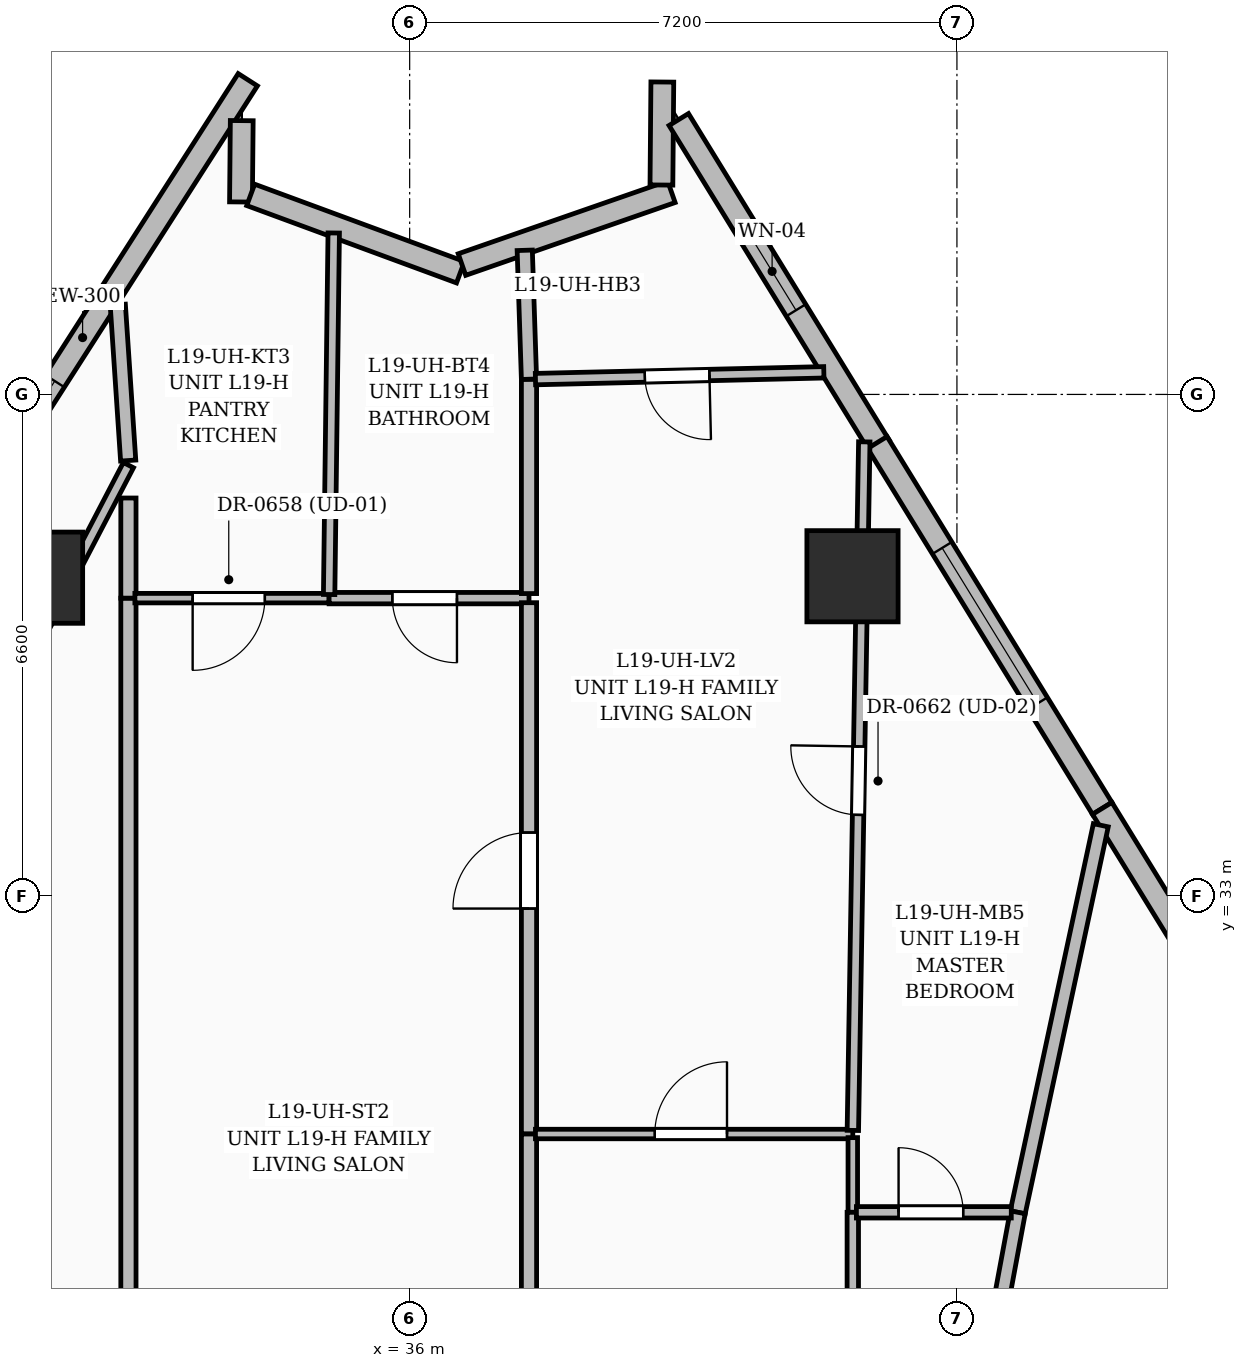
"""IFC4 building model, lengths in metres.
Left out: names, types, materials, properties, quantities, classifications, styles, units other than length and angle.
Written with IfcOpenShell. Run it as: python <this file> out.ifc"""

import sys

from ifc_helpers import new_model, si_unit, direction, frame, frame_2d, origin, origin_2d, place, context, subcontext, project, spatial, rectangle, extrude, element, fill, save


model = new_model("IFC4")
c1 = context("Model", 3, precision=1e-05, world=origin(), true_north=direction((0.0, 1.0)))
c2 = subcontext(c1, "Body", "Model", "MODEL_VIEW")
j1 = project(units=[si_unit("LENGTHUNIT", "METRE"), si_unit("PLANEANGLEUNIT", "RADIAN")], contexts=[c1])
p1 = place(None, origin())
s1 = spatial("IfcSite", under=j1, at=p1, CompositionType="ELEMENT")
p2 = place(p1, origin())
s2 = spatial("IfcBuilding", under=s1, at=p2, CompositionType="ELEMENT")
p3 = place(p2, frame((0.0, 0.0, 78.6)))
s3 = spatial("IfcBuildingStorey", under=s2, at=p3, CompositionType="ELEMENT", Elevation=78.6)
for number, where, z_axis, x_axis in (
    (1, (41.826, 37.208, 0.0), (0.0, 0.0, 1.0), (1.0, 0.0, 0.0)),
    (2, (31.098, 37.189, 0.0), (0.0, 0.0, 1.0), (1.0, 0.0, 0.0)),
):
    element("IfcColumn", number, at=place(p3, frame(where, z_axis=z_axis, x_axis=x_axis)), inside=s3, PredefinedType="COLUMN", context=c2, shape_type="SweptSolid", body=[
        extrude(rectangle(XDim=1.2, YDim=1.2, at=origin_2d()), origin(), (0.0, 0.0, 1.0), 3.6),
    ])
p4 = place(p3, frame((29.524, 36.955, 0.0), z_axis=(0.0, 0.0, 1.0), x_axis=(0.539470626143, 0.842004420136, 0.0)))
e3 = element("IfcWall", 3, at=p4, inside=s3, PredefinedType="SOLIDWALL", context=c2, shape_type="SweptSolid", body=[
    extrude(rectangle(XDim=8.058, YDim=0.3, at=frame_2d((4.029, 0.0))), origin(), (0.0, 0.0, 1.0), 3.35),
])
p5 = place(p4, frame((0.95, 0.0, 0.6)))
e4 = element("IfcOpeningElement", 4, at=p5, cuts=e3, PredefinedType="OPENING", context=c2, shape_type="SweptSolid", body=[
    extrude(rectangle(XDim=2.4, YDim=2.1, at=frame_2d((1.2, 1.05))), frame((0.0, 0.16, 0.0), z_axis=(0.0, -1.0, 0.0), x_axis=(1.0, 0.0, 0.0)), (0.0, 0.0, 1.0), 0.32),
])
p6 = place(p3, frame((33.791, 43.202, 0.0), z_axis=(0.0, 0.0, 1.0), x_axis=(-0.009584224316, -0.999954070267, 0.0)))
e5 = element("IfcWall", 5, at=p6, inside=s3, PredefinedType="SOLIDWALL", context=c2, shape_type="SweptSolid", body=[
    extrude(rectangle(XDim=1.07, YDim=0.3, at=frame_2d((0.535, 0.0))), origin(), (0.0, 0.0, 1.0), 3.35),
])
p7 = place(p3, frame((33.909, 42.225, 0.0), z_axis=(0.0, 0.0, 1.0), x_axis=(0.938225446259, -0.346024582931, 0.0)))
e6 = element("IfcWall", 6, at=p7, inside=s3, PredefinedType="SOLIDWALL", context=c2, shape_type="SweptSolid", body=[
    extrude(rectangle(XDim=2.941, YDim=0.3, at=frame_2d((1.471, 0.0))), origin(), (0.0, 0.0, 1.0), 3.35),
])
p8 = place(p3, frame((36.688, 41.309, 0.0), z_axis=(0.0, 0.0, 1.0), x_axis=(0.944571305793, 0.328306332978, 0.0)))
e7 = element("IfcWall", 7, at=p8, inside=s3, PredefinedType="SOLIDWALL", context=c2, shape_type="SweptSolid", body=[
    extrude(rectangle(XDim=2.917, YDim=0.3, at=frame_2d((1.458, 0.0))), origin(), (0.0, 0.0, 1.0), 3.35),
])
p9 = place(p3, frame((39.312, 42.355, 0.0), z_axis=(0.0, 0.0, 1.0), x_axis=(0.008828484753, 0.999961028169, 0.0)))
e8 = element("IfcWall", 8, at=p9, inside=s3, PredefinedType="SOLIDWALL", context=c2, shape_type="SweptSolid", body=[
    extrude(rectangle(XDim=1.355, YDim=0.3, at=frame_2d((0.677, 0.0))), origin(), (0.0, 0.0, 1.0), 3.35),
])
p10 = place(p3, frame((39.54, 43.217, 0.0), z_axis=(0.0, 0.0, 1.0), x_axis=(0.52373802156, -0.851879383935, 0.0)))
e9 = element("IfcWall", 9, at=p10, inside=s3, PredefinedType="SOLIDWALL", context=c2, shape_type="SweptSolid", body=[
    extrude(rectangle(XDim=5.042, YDim=0.3, at=frame_2d((2.521, 0.0))), origin(), (0.0, 0.0, 1.0), 3.35),
])
p11 = place(p10, frame((1.745, 0.0, 0.8)))
e10 = element("IfcOpeningElement", 10, at=p11, cuts=e9, PredefinedType="OPENING", context=c2, shape_type="SweptSolid", body=[
    extrude(rectangle(XDim=1.2, YDim=1.8, at=frame_2d((0.6, 0.9))), frame((0.0, 0.16, 0.0), z_axis=(0.0, -1.0, 0.0), x_axis=(1.0, 0.0, 0.0)), (0.0, 0.0, 1.0), 0.32),
])
p12 = place(p3, frame((42.153, 38.967, 0.0), z_axis=(0.0, 0.0, 1.0), x_axis=(0.523687465278, -0.851910464022, 0.0)))
e11 = element("IfcWall", 11, at=p12, inside=s3, PredefinedType="SOLIDWALL", context=c2, shape_type="SweptSolid", body=[
    extrude(rectangle(XDim=5.649, YDim=0.3, at=frame_2d((2.825, 0.0))), origin(), (0.0, 0.0, 1.0), 3.35),
])
p13 = place(p12, frame((1.628, 0.0, 0.6)))
e12 = element("IfcOpeningElement", 12, at=p13, cuts=e11, PredefinedType="OPENING", context=c2, shape_type="SweptSolid", body=[
    extrude(rectangle(XDim=2.4, YDim=2.1, at=frame_2d((1.2, 1.05))), frame((0.0, 0.16, 0.0), z_axis=(0.0, -1.0, 0.0), x_axis=(1.0, 0.0, 0.0)), (0.0, 0.0, 1.0), 0.32),
])
p14 = place(p3, frame((45.111, 34.154, 0.0), z_axis=(0.0, 0.0, 1.0), x_axis=(0.523710369238, -0.851896384047, 0.0)))
e13 = element("IfcWall", 13, at=p14, inside=s3, PredefinedType="SOLIDWALL", context=c2, shape_type="SweptSolid", body=[
    extrude(rectangle(XDim=5.596, YDim=0.3, at=frame_2d((2.798, 0.0))), origin(), (0.0, 0.0, 1.0), 3.35),
])
p15 = place(p14, frame((1.85, 0.0, 0.55)))
e14 = element("IfcOpeningElement", 14, at=p15, cuts=e13, PredefinedType="OPENING", context=c2, shape_type="SweptSolid", body=[
    extrude(rectangle(XDim=2.1, YDim=2.4, at=frame_2d((1.05, 1.2))), frame((0.0, 0.16, 0.0), z_axis=(0.0, -1.0, 0.0), x_axis=(1.0, 0.0, 0.0)), (0.0, 0.0, 1.0), 0.32),
])
p16 = place(p3, frame((21.4, 17.75, 0.0), z_axis=(0.0, 0.0, 1.0), x_axis=(0.46207959711, 0.886838455376, 0.0)))
e15 = element("IfcWall", 15, at=p16, inside=s3, PredefinedType="PARTITIONING", context=c2, shape_type="SweptSolid", body=[
    extrude(rectangle(XDim=23.589, YDim=0.15, at=frame_2d((11.795, 0.0))), origin(), (0.0, 0.0, 1.0), 2.345),
])
p17 = place(p3, frame((32.297, 38.73, 0.0), z_axis=(0.0, 0.0, 1.0), x_axis=(-0.066629370629, 0.997777794386, 0.0)))
e16 = element("IfcWall", 16, at=p17, inside=s3, PredefinedType="PARTITIONING", context=c2, shape_type="SweptSolid", body=[
    extrude(rectangle(XDim=2.056, YDim=0.2, at=frame_2d((1.028, 0.0))), origin(), (0.0, 0.0, 1.0), 3.35),
])
p18 = place(p3, frame((32.3, 26.145, 0.0), z_axis=(0.0, 0.0, 1.0), x_axis=(0.0, 1.0, 0.0)))
e17 = element("IfcWall", 17, at=p18, inside=s3, PredefinedType="PARTITIONING", context=c2, shape_type="SweptSolid", body=[
    extrude(rectangle(XDim=10.775, YDim=0.2, at=frame_2d((5.387, 0.0))), origin(), (0.0, 0.0, 1.0), 2.345),
])
p19 = place(p3, frame((32.3, 36.92, 0.0), z_axis=(0.0, 0.0, 1.0), x_axis=(0.0, 1.0, 0.0)))
e18 = element("IfcWall", 18, at=p19, inside=s3, PredefinedType="PARTITIONING", context=c2, shape_type="SweptSolid", body=[
    extrude(rectangle(XDim=1.317, YDim=0.2, at=frame_2d((0.659, 0.0))), origin(), (0.0, 0.0, 1.0), 2.37),
])
p20 = place(p3, frame((45.093, 33.932, 0.0), z_axis=(0.0, 0.0, 1.0), x_axis=(-0.209881245986, -0.977726885476, 0.0)))
e19 = element("IfcWall", 19, at=p20, inside=s3, PredefinedType="PARTITIONING", context=c2, shape_type="SweptSolid", body=[
    extrude(rectangle(XDim=5.208, YDim=0.2, at=frame_2d((2.604, 0.0))), origin(), (0.0, 0.0, 1.0), 2.37),
])
p21 = place(p3, frame((44.0, 28.84, 0.0), z_axis=(0.0, 0.0, 1.0), x_axis=(-0.18247668152, -0.983210181345, 0.0)))
e20 = element("IfcWall", 20, at=p21, inside=s3, PredefinedType="PARTITIONING", context=c2, shape_type="SweptSolid", body=[
    extrude(rectangle(XDim=2.685, YDim=0.2, at=frame_2d((1.343, 0.0))), origin(), (0.0, 0.0, 1.0), 3.01),
])
p22 = place(p3, frame((34.94, 36.92, 0.0), z_axis=(0.0, 0.0, 1.0), x_axis=(-1.0, 0.0, 0.0)))
e21 = element("IfcWall", 21, at=p22, inside=s3, PredefinedType="PARTITIONING", context=c2, shape_type="SweptSolid", body=[
    extrude(rectangle(XDim=2.555, YDim=0.125, at=frame_2d((1.277, 0.0))), origin(), (0.0, 0.0, 1.0), 2.37),
])
p23 = place(p22, frame((0.845, 0.0, 0.0)))
e22 = element("IfcOpeningElement", 22, at=p23, cuts=e21, PredefinedType="OPENING", context=c2, shape_type="SweptSolid", body=[
    extrude(rectangle(XDim=0.95, YDim=2.2, at=frame_2d((0.475, 1.1))), frame((0.0, 0.072, 0.0), z_axis=(0.0, -1.0, 0.0), x_axis=(1.0, 0.0, 0.0)), (0.0, 0.0, 1.0), 0.145),
])
p24 = place(p3, frame((37.57, 36.92, 0.0), z_axis=(0.0, 0.0, 1.0), x_axis=(-1.0, 0.0, 0.0)))
e23 = element("IfcWall", 23, at=p24, inside=s3, PredefinedType="PARTITIONING", context=c2, shape_type="SweptSolid", body=[
    extrude(rectangle(XDim=2.63, YDim=0.15, at=frame_2d((1.315, 0.0))), origin(), (0.0, 0.0, 1.0), 2.37),
])
p25 = place(p24, frame((0.948, 0.0, 0.0)))
e24 = element("IfcOpeningElement", 24, at=p25, cuts=e23, PredefinedType="OPENING", context=c2, shape_type="SweptSolid", body=[
    extrude(rectangle(XDim=0.85, YDim=2.1, at=frame_2d((0.425, 1.05))), frame((0.0, 0.085, 0.0), z_axis=(0.0, -1.0, 0.0), x_axis=(1.0, 0.0, 0.0)), (0.0, 0.0, 1.0), 0.17),
])
p26 = place(p3, frame((37.57, 29.87, 0.0), z_axis=(0.0, 0.0, 1.0), x_axis=(0.0, 1.0, 0.0)))
e25 = element("IfcWall", 25, at=p26, inside=s3, PredefinedType="PARTITIONING", context=c2, shape_type="SweptSolid", body=[
    extrude(rectangle(XDim=6.99, YDim=0.2, at=frame_2d((3.495, 0.0))), origin(), (0.0, 0.0, 1.0), 2.37),
])
p27 = place(p26, frame((2.966, 0.0, 0.0)))
e26 = element("IfcOpeningElement", 26, at=p27, cuts=e25, PredefinedType="OPENING", context=c2, shape_type="SweptSolid", body=[
    extrude(rectangle(XDim=1.0, YDim=2.2, at=frame_2d((0.5, 1.1))), frame((0.0, 0.11, 0.0), z_axis=(0.0, -1.0, 0.0), x_axis=(1.0, 0.0, 0.0)), (0.0, 0.0, 1.0), 0.22),
])
p28 = place(p3, frame((37.57, 26.015, 0.0), z_axis=(0.0, 0.0, 1.0), x_axis=(0.0, 1.0, 0.0)))
e27 = element("IfcWall", 27, at=p28, inside=s3, PredefinedType="PARTITIONING", context=c2, shape_type="SweptSolid", body=[
    extrude(rectangle(XDim=3.855, YDim=0.2, at=frame_2d((1.928, 0.0))), origin(), (0.0, 0.0, 1.0), 3.01),
])
p29 = place(p3, frame((34.94, 36.968, 0.0), z_axis=(0.0, 0.0, 1.0), x_axis=(0.012728014725, 0.99991899554, 0.0)))
e28 = element("IfcWall", 28, at=p29, inside=s3, PredefinedType="PARTITIONING", context=c2, shape_type="SweptSolid", body=[
    extrude(rectangle(XDim=4.757, YDim=0.15, at=frame_2d((2.378, 0.0))), origin(), (0.0, 0.0, 1.0), 2.37),
])
p30 = place(p3, frame((37.57, 36.98, 0.0), z_axis=(0.0, 0.0, 1.0), x_axis=(0.0, 1.0, 0.0)))
e29 = element("IfcWall", 29, at=p30, inside=s3, PredefinedType="PARTITIONING", context=c2, shape_type="SweptSolid", body=[
    extrude(rectangle(XDim=2.82, YDim=0.2, at=frame_2d((1.41, 0.0))), origin(), (0.0, 0.0, 1.0), 2.37),
])
p31 = place(p3, frame((37.57, 39.8, 0.0), z_axis=(0.0, 0.0, 1.0), x_axis=(-0.033089686033, 0.999452386399, 0.0)))
e30 = element("IfcWall", 30, at=p31, inside=s3, PredefinedType="PARTITIONING", context=c2, shape_type="SweptSolid", body=[
    extrude(rectangle(XDim=1.697, YDim=0.2, at=frame_2d((0.849, 0.0))), origin(), (0.0, 0.0, 1.0), 3.35),
])
p32 = place(p3, frame((41.449, 39.891, 0.0), z_axis=(0.0, 0.0, 1.0), x_axis=(-0.999721247685, -0.02360989047, 0.0)))
e31 = element("IfcWall", 31, at=p32, inside=s3, PredefinedType="PARTITIONING", context=c2, shape_type="SweptSolid", body=[
    extrude(rectangle(XDim=3.795, YDim=0.15, at=frame_2d((1.897, 0.0))), origin(), (0.0, 0.0, 1.0), 3.35),
])
p33 = place(p32, frame((1.506, 0.0, 0.0)))
e32 = element("IfcOpeningElement", 32, at=p33, cuts=e31, PredefinedType="OPENING", context=c2, shape_type="SweptSolid", body=[
    extrude(rectangle(XDim=0.85, YDim=2.1, at=frame_2d((0.425, 1.05))), frame((0.0, 0.085, 0.0), z_axis=(0.0, -1.0, 0.0), x_axis=(1.0, 0.0, 0.0)), (0.0, 0.0, 1.0), 0.17),
])
p34 = place(p3, frame((37.655, 29.87, 0.0), z_axis=(0.0, 0.0, 1.0), x_axis=(1.0, 0.0, 0.0)))
e33 = element("IfcWall", 33, at=p34, inside=s3, PredefinedType="PARTITIONING", context=c2, shape_type="SweptSolid", body=[
    extrude(rectangle(XDim=4.175, YDim=0.125, at=frame_2d((2.087, 0.0))), origin(), (0.0, 0.0, 1.0), 3.35),
])
p35 = place(p34, frame((1.57, 0.0, 0.0)))
e34 = element("IfcOpeningElement", 34, at=p35, cuts=e33, PredefinedType="OPENING", context=c2, shape_type="SweptSolid", body=[
    extrude(rectangle(XDim=0.95, YDim=2.2, at=frame_2d((0.475, 1.1))), frame((0.0, 0.072, 0.0), z_axis=(0.0, -1.0, 0.0), x_axis=(1.0, 0.0, 0.0)), (0.0, 0.0, 1.0), 0.145),
])
p36 = place(p3, frame((41.831, 29.917, 0.0), z_axis=(0.0, 0.0, 1.0), x_axis=(0.016599696118, 0.999862215552, 0.0)))
e35 = element("IfcWall", 35, at=p36, inside=s3, PredefinedType="PARTITIONING", context=c2, shape_type="SweptSolid", body=[
    extrude(rectangle(XDim=9.06, YDim=0.15, at=frame_2d((4.53, 0.0))), origin(), (0.0, 0.0, 1.0), 2.345),
])
p37 = place(p36, frame((4.152, 0.0, 0.0)))
e36 = element("IfcOpeningElement", 36, at=p37, cuts=e35, PredefinedType="OPENING", context=c2, shape_type="SweptSolid", body=[
    extrude(rectangle(XDim=0.9, YDim=2.15, at=frame_2d((0.45, 1.075))), frame((0.0, 0.085, 0.0), z_axis=(0.0, -1.0, 0.0), x_axis=(1.0, 0.0, 0.0)), (0.0, 0.0, 1.0), 0.17),
])
p38 = place(p3, frame((41.83, 28.84, 0.0), z_axis=(0.0, 0.0, 1.0), x_axis=(0.0, 1.0, 0.0)))
e37 = element("IfcWall", 37, at=p38, inside=s3, PredefinedType="PARTITIONING", context=c2, shape_type="SweptSolid", body=[
    extrude(rectangle(XDim=0.982, YDim=0.125, at=frame_2d((0.491, 0.0))), origin(), (0.0, 0.0, 1.0), 3.01),
])
p39 = place(p3, frame((41.83, 26.015, 0.0), z_axis=(0.0, 0.0, 1.0), x_axis=(0.0, 1.0, 0.0)))
e38 = element("IfcWall", 38, at=p39, inside=s3, PredefinedType="PARTITIONING", context=c2, shape_type="SweptSolid", body=[
    extrude(rectangle(XDim=2.825, YDim=0.15, at=frame_2d((1.413, 0.0))), origin(), (0.0, 0.0, 1.0), 2.309),
])
p40 = place(p3, frame((41.877, 28.84, 0.0), z_axis=(0.0, 0.0, 1.0), x_axis=(1.0, 0.0, 0.0)))
e39 = element("IfcWall", 39, at=p40, inside=s3, PredefinedType="PARTITIONING", context=c2, shape_type="SweptSolid", body=[
    extrude(rectangle(XDim=2.038, YDim=0.15, at=frame_2d((1.019, 0.0))), origin(), (0.0, 0.0, 1.0), 2.345),
])
p41 = place(p40, frame((0.555, 0.0, 0.0)))
e40 = element("IfcOpeningElement", 40, at=p41, cuts=e39, PredefinedType="OPENING", context=c2, shape_type="SweptSolid", body=[
    extrude(rectangle(XDim=0.85, YDim=2.1, at=frame_2d((0.425, 1.05))), frame((0.0, 0.085, 0.0), z_axis=(0.0, -1.0, 0.0), x_axis=(1.0, 0.0, 0.0)), (0.0, 0.0, 1.0), 0.17),
])
p42 = place(p5, origin())
e41 = element("IfcWindow", 41, at=p42, inside=s3, PartitioningType="SINGLE_PANEL", PredefinedType="WINDOW", context=c2, shape_type="SweptSolid", body=[
    extrude(rectangle(XDim=2.4, YDim=2.1, at=frame_2d((1.2, 1.05))), frame((0.0, 0.03, 0.0), z_axis=(0.0, -1.0, 0.0), x_axis=(1.0, 0.0, 0.0)), (0.0, 0.0, 1.0), 0.06),
])
fill(e4, e41)
p43 = place(p11, origin())
e42 = element("IfcWindow", 42, at=p43, inside=s3, PartitioningType="SINGLE_PANEL", PredefinedType="WINDOW", context=c2, shape_type="SweptSolid", body=[
    extrude(rectangle(XDim=1.2, YDim=1.8, at=frame_2d((0.6, 0.9))), frame((0.0, 0.03, 0.0), z_axis=(0.0, -1.0, 0.0), x_axis=(1.0, 0.0, 0.0)), (0.0, 0.0, 1.0), 0.06),
])
fill(e10, e42)
p44 = place(p13, origin())
e43 = element("IfcWindow", 43, at=p44, inside=s3, PartitioningType="SINGLE_PANEL", PredefinedType="WINDOW", context=c2, shape_type="SweptSolid", body=[
    extrude(rectangle(XDim=2.4, YDim=2.1, at=frame_2d((1.2, 1.05))), frame((0.0, 0.03, 0.0), z_axis=(0.0, -1.0, 0.0), x_axis=(1.0, 0.0, 0.0)), (0.0, 0.0, 1.0), 0.06),
])
fill(e12, e43)
p45 = place(p23, origin())
e44 = element("IfcDoor", 44, at=p45, inside=s3, OperationType="SINGLE_SWING_RIGHT", PredefinedType="DOOR", context=c2, shape_type="SweptSolid", body=[
    extrude(rectangle(XDim=0.95, YDim=2.2, at=frame_2d((0.475, 1.1))), frame((0.0, 0.025, 0.0), z_axis=(0.0, -1.0, 0.0), x_axis=(1.0, 0.0, 0.0)), (0.0, 0.0, 1.0), 0.05),
])
fill(e22, e44)
p46 = place(p25, origin())
e45 = element("IfcDoor", 45, at=p46, inside=s3, OperationType="SINGLE_SWING_LEFT", PredefinedType="DOOR", context=c2, shape_type="SweptSolid", body=[
    extrude(rectangle(XDim=0.85, YDim=2.1, at=frame_2d((0.425, 1.05))), frame((0.0, 0.025, 0.0), z_axis=(0.0, -1.0, 0.0), x_axis=(1.0, 0.0, 0.0)), (0.0, 0.0, 1.0), 0.05),
])
fill(e24, e45)
p47 = place(p35, origin())
e46 = element("IfcDoor", 46, at=p47, inside=s3, OperationType="SINGLE_SWING_RIGHT", PredefinedType="DOOR", context=c2, shape_type="SweptSolid", body=[
    extrude(rectangle(XDim=0.95, YDim=2.2, at=frame_2d((0.475, 1.1))), frame((0.0, 0.025, 0.0), z_axis=(0.0, -1.0, 0.0), x_axis=(1.0, 0.0, 0.0)), (0.0, 0.0, 1.0), 0.05),
])
fill(e34, e46)
p48 = place(p33, origin())
e47 = element("IfcDoor", 47, at=p48, inside=s3, OperationType="SINGLE_SWING_LEFT", PredefinedType="DOOR", context=c2, shape_type="SweptSolid", body=[
    extrude(rectangle(XDim=0.85, YDim=2.1, at=frame_2d((0.425, 1.05))), frame((0.0, 0.025, 0.0), z_axis=(0.0, -1.0, 0.0), x_axis=(1.0, 0.0, 0.0)), (0.0, 0.0, 1.0), 0.05),
])
fill(e32, e47)
p49 = place(p37, origin())
e48 = element("IfcDoor", 48, at=p49, inside=s3, OperationType="SINGLE_SWING_RIGHT", PredefinedType="DOOR", context=c2, shape_type="SweptSolid", body=[
    extrude(rectangle(XDim=0.9, YDim=2.15, at=frame_2d((0.45, 1.075))), frame((0.0, 0.025, 0.0), z_axis=(0.0, -1.0, 0.0), x_axis=(1.0, 0.0, 0.0)), (0.0, 0.0, 1.0), 0.05),
])
fill(e36, e48)
p50 = place(p41, origin())
e49 = element("IfcDoor", 49, at=p50, inside=s3, OperationType="SINGLE_SWING_LEFT", PredefinedType="DOOR", context=c2, shape_type="SweptSolid", body=[
    extrude(rectangle(XDim=0.85, YDim=2.1, at=frame_2d((0.425, 1.05))), frame((0.0, 0.025, 0.0), z_axis=(0.0, -1.0, 0.0), x_axis=(1.0, 0.0, 0.0)), (0.0, 0.0, 1.0), 0.05),
])
fill(e40, e49)
p51 = place(p27, origin())
e50 = element("IfcDoor", 50, at=p51, inside=s3, OperationType="SINGLE_SWING_LEFT", PredefinedType="DOOR", context=c2, shape_type="SweptSolid", body=[
    extrude(rectangle(XDim=1.0, YDim=2.2, at=frame_2d((0.5, 1.1))), frame((0.0, 0.025, 0.0), z_axis=(0.0, -1.0, 0.0), x_axis=(1.0, 0.0, 0.0)), (0.0, 0.0, 1.0), 0.05),
])
fill(e26, e50)
save(model, sys.argv[1])
